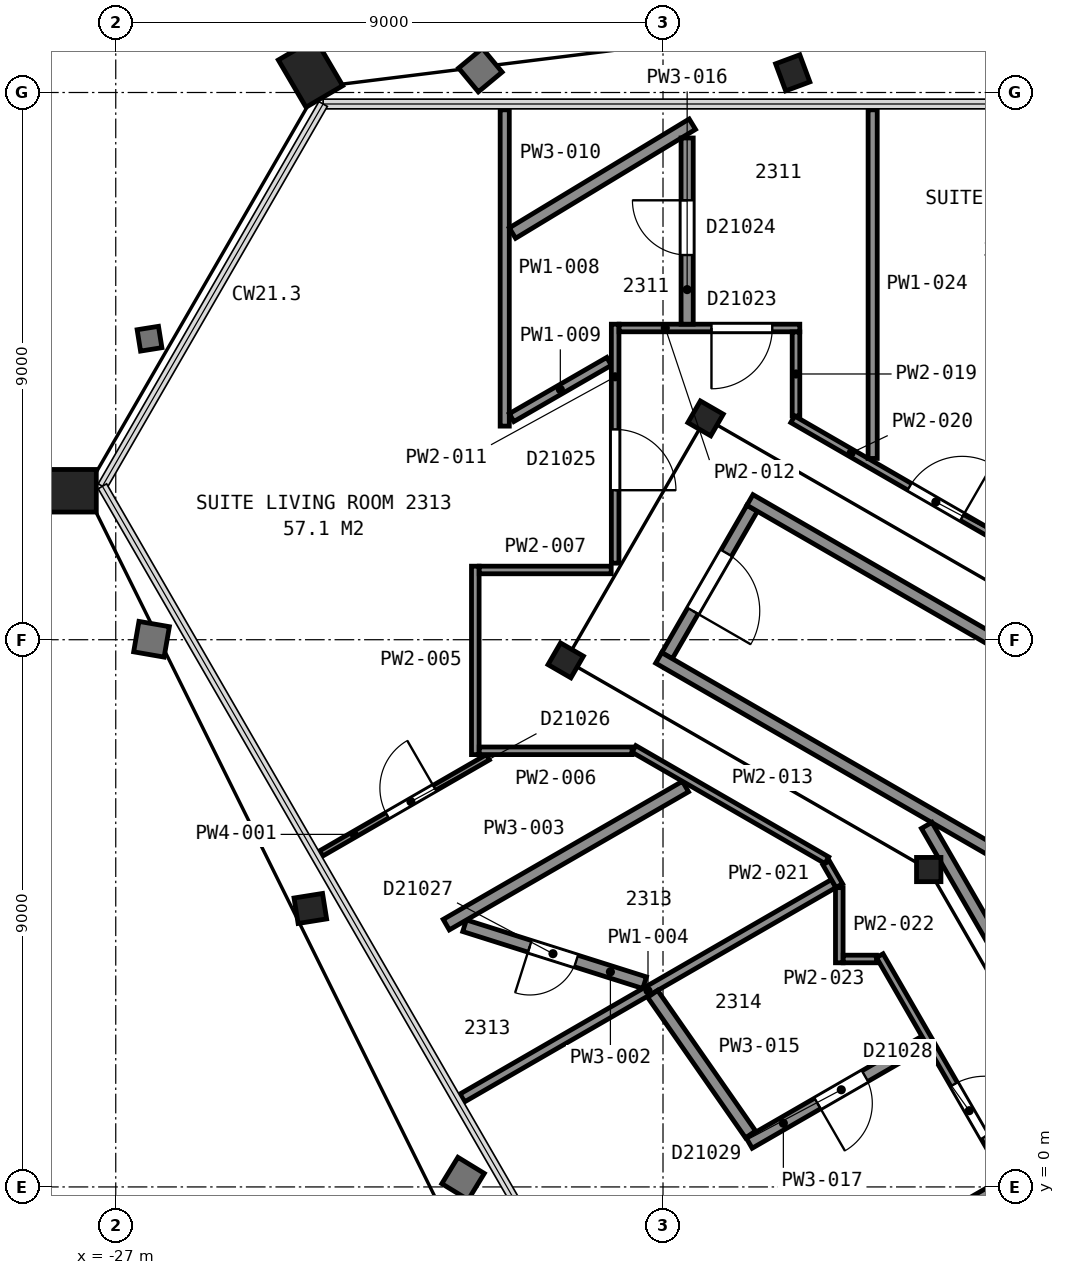
"""IFC4 building model, lengths in metres.
Left out: names, types, materials, properties, quantities, classifications, styles, units other than length and angle.
Written with IfcOpenShell. Run it as: python <this file> out.ifc"""

import sys

from ifc_helpers import new_model, si_unit, direction, frame, frame_2d, origin, origin_2d, place, context, subcontext, project, spatial, rectangle, hollow_rectangle, i_section, extrude, element, fill, save


model = new_model("IFC4")
c1 = context("Model", 3, precision=1e-05, world=origin(), true_north=direction((0.0, 1.0)))
c2 = subcontext(c1, "Body", "Model", "MODEL_VIEW")
j1 = project(units=[si_unit("LENGTHUNIT", "METRE"), si_unit("PLANEANGLEUNIT", "RADIAN")], contexts=[c1])
p1 = place(None, origin())
s1 = spatial("IfcSite", under=j1, at=p1, CompositionType="ELEMENT")
p2 = place(p1, origin())
s2 = spatial("IfcBuilding", under=s1, at=p2, CompositionType="ELEMENT")
p3 = place(p2, frame((0.0, 0.0, 100.0)))
s3 = spatial("IfcBuildingStorey", under=s2, at=p3, CompositionType="ELEMENT", Elevation=100.0)
p4 = place(p3, frame((-15.783, 18.099, 0.045), z_axis=(-0.070693557191, 0.19042310781, 0.97915344098), x_axis=(0.997401572089, -0.000160176462, 0.072042198318)))
e1 = element("IfcColumn", 1, at=p4, inside=s3, PredefinedType="COLUMN", context=c2, shape_type="SweptSolid", body=[
    extrude(i_section(OverallWidth=0.424, OverallDepth=0.475, WebThickness=0.048, FlangeThickness=0.077, FilletRadius=0.015, at=origin_2d()), origin(), (0.0, 0.0, 1.0), 3.585),
])
p5 = place(p3, frame((-23.668, 18.104, 0.075), z_axis=(-0.111145878735, 0.189707375629, 0.975529448696), x_axis=(0.496818547965, 0.860754575623, -0.110783080574)))
e2 = element("IfcColumn", 2, at=p5, inside=s3, PredefinedType="COLUMN", context=c2, shape_type="SweptSolid", body=[
    extrude(hollow_rectangle(XDim=0.7, YDim=0.9, WallThickness=0.065, at=origin_2d()), origin(), (0.0, 0.0, 1.0), 3.536),
])
p6 = place(p3, frame((-27.517, 11.45, 0.075), z_axis=(-0.21954669437, 0.0, 0.975601993126), x_axis=(0.496862162048, 0.860596286786, 0.111812446063)))
e3 = element("IfcColumn", 3, at=p6, inside=s3, PredefinedType="COLUMN", context=c2, shape_type="SweptSolid", body=[
    extrude(hollow_rectangle(XDim=0.7, YDim=0.9, WallThickness=0.065, at=origin_2d()), origin(), (0.0, 0.0, 1.0), 3.536),
])
p7 = place(p3, frame((-23.559, 4.618, 0.045), z_axis=(-0.203832262206, -0.03259955045, 0.978462916106), x_axis=(-0.498534021373, 0.86361257453, -0.075080960618)))
e4 = element("IfcColumn", 4, at=p7, inside=s3, PredefinedType="COLUMN", context=c2, shape_type="SweptSolid", body=[
    extrude(i_section(OverallWidth=0.424, OverallDepth=0.475, WebThickness=0.048, FlangeThickness=0.077, FilletRadius=0.015, at=origin_2d()), origin(), (0.0, 0.0, 1.0), 3.587),
])
for number, where, z_axis, x_axis in (
    (5, (-17.3, 12.64, 0.0), (0.0, 0.0, 1.0), (0.5, 0.866, 0.0)),
    (6, (-19.6, 8.66, 0.0), (0.0, 0.0, 1.0), (0.5, 0.866, 0.0)),
):
    element("IfcColumn", number, at=place(p3, frame(where, z_axis=z_axis, x_axis=x_axis)), inside=s3, PredefinedType="COLUMN", context=c2, shape_type="SweptSolid", body=[
        extrude(i_section(OverallWidth=0.411, OverallDepth=0.434, WebThickness=0.036, FlangeThickness=0.057, FilletRadius=0.015, at=origin_2d()), origin(), (0.0, 0.0, 1.0), 3.6),
    ])
p8 = place(p3, frame((-13.63, 5.22, 0.0), z_axis=(0.0, 0.0, 1.0), x_axis=(1.0, 0.0, 0.0)))
e7 = element("IfcColumn", 7, at=p8, inside=s3, PredefinedType="COLUMN", context=c2, shape_type="SweptSolid", body=[
    extrude(i_section(OverallWidth=0.401, OverallDepth=0.399, WebThickness=0.025, FlangeThickness=0.04, FilletRadius=0.015, at=origin_2d()), origin(), (0.0, 0.0, 1.0), 3.6),
])
p9 = place(p3, frame((-16.534, 11.162, 0.0), z_axis=(0.0, 0.0, 1.0), x_axis=(-0.49998411664, -0.866034573852, 0.0)))
e8 = element("IfcWall", 8, at=p9, inside=s3, PredefinedType="PARTITIONING", context=c2, shape_type="SweptSolid", body=[
    extrude(rectangle(XDim=2.8, YDim=0.2, at=frame_2d((1.4, 0.0))), origin(), (0.0, 0.0, 1.0), 3.35),
])
p10 = place(p9, frame((0.85, 0.0, 0.0)))
e9 = element("IfcOpeningElement", 9, at=p10, cuts=e8, PredefinedType="OPENING", context=c2, shape_type="SweptSolid", body=[
    extrude(rectangle(XDim=1.1, YDim=2.1, at=frame_2d((0.55, 1.05))), frame((0.0, 0.11, 0.0), z_axis=(0.0, -1.0, 0.0), x_axis=(1.0, 0.0, 0.0)), (0.0, 0.0, 1.0), 0.22),
])
for number, where, z_axis, x_axis in (
    (10, (-7.678, 2.701, 0.0), (0.0, 0.0, 1.0), (-0.866, 0.5, 0.0)),
    (11, (-6.178, 5.299, 0.0), (0.0, 0.0, 1.0), (-0.866, 0.5, 0.0)),
):
    element("IfcWall", number, at=place(p3, frame(where, z_axis=z_axis, x_axis=x_axis)), inside=s3, PredefinedType="PARTITIONING", context=c2, shape_type="SweptSolid", body=[
        extrude(rectangle(XDim=12.0, YDim=0.2, at=frame_2d((6.0, 0.0))), origin(), (0.0, 0.0, 1.0), 3.35),
    ])
p11 = place(p3, frame((-13.664, 5.946, 0.0), z_axis=(0.0, 0.0, 1.0), x_axis=(0.499994327219, -0.866028678941, 0.0)))
e12 = element("IfcWall", 12, at=p11, inside=s3, PredefinedType="PARTITIONING", context=c2, shape_type="SweptSolid", body=[
    extrude(rectangle(XDim=23.968, YDim=0.2, at=frame_2d((11.984, 0.0))), origin(), (0.0, 0.0, 1.0), 3.35),
])
p12 = place(p3, frame((-20.88, 7.067, 0.0), z_axis=(0.0, 0.0, 1.0), x_axis=(-0.866127794624, -0.499822611913, 0.0)))
e13 = element("IfcWall", 13, at=p12, inside=s3, PredefinedType="PARTITIONING", context=c2, shape_type="SweptSolid", body=[
    extrude(rectangle(XDim=3.165, YDim=0.1, at=frame_2d((1.583, 0.0))), origin(), (0.0, 0.0, 1.0), 2.613),
])
p13 = place(p12, frame((1.011, 0.0, 0.0)))
e14 = element("IfcOpeningElement", 14, at=p13, cuts=e13, PredefinedType="OPENING", context=c2, shape_type="SweptSolid", body=[
    extrude(rectangle(XDim=0.9, YDim=2.1, at=frame_2d((0.45, 1.05))), frame((0.0, 0.06, 0.0), z_axis=(0.0, -1.0, 0.0), x_axis=(1.0, 0.0, 0.0)), (0.0, 0.0, 1.0), 0.12),
])
p14 = place(p3, frame((-21.263, 4.296, 0.0), z_axis=(0.0, 0.0, 1.0), x_axis=(0.95341383314, -0.301665481582, 0.0)))
e15 = element("IfcWall", 15, at=p14, inside=s3, PredefinedType="PARTITIONING", context=c2, shape_type="SweptSolid", body=[
    extrude(rectangle(XDim=3.106, YDim=0.2, at=frame_2d((1.553, 0.0))), origin(), (0.0, 0.0, 1.0), 2.613),
])
p15 = place(p14, frame((1.125, 0.0, 0.0)))
e16 = element("IfcOpeningElement", 16, at=p15, cuts=e15, PredefinedType="OPENING", context=c2, shape_type="SweptSolid", body=[
    extrude(rectangle(XDim=0.8, YDim=2.1, at=frame_2d((0.4, 1.05))), frame((0.0, 0.11, 0.0), z_axis=(0.0, -1.0, 0.0), x_axis=(1.0, 0.0, 0.0)), (0.0, 0.0, 1.0), 0.22),
])
p16 = place(p3, frame((-21.565, 4.314, 0.0), z_axis=(0.0, 0.0, 1.0), x_axis=(0.866058501026, 0.499942669514, 0.0)))
e17 = element("IfcWall", 17, at=p16, inside=s3, PredefinedType="PARTITIONING", context=c2, shape_type="SweptSolid", body=[
    extrude(rectangle(XDim=4.542, YDim=0.2, at=frame_2d((2.271, 0.0))), origin(), (0.0, 0.0, 1.0), 2.613),
])
p17 = place(p3, frame((-21.301, 1.464, 0.0), z_axis=(0.0, 0.0, 1.0), x_axis=(0.866055299146, 0.49994821614, 0.0)))
e18 = element("IfcWall", 18, at=p17, inside=s3, PredefinedType="PARTITIONING", context=c2, shape_type="SweptSolid", body=[
    extrude(rectangle(XDim=7.052, YDim=0.15, at=frame_2d((3.526, 0.0))), origin(), (0.0, 0.0, 1.0), 2.613),
])
p18 = place(p3, frame((-21.087, 7.111, 0.0), z_axis=(0.0, 0.0, 1.0), x_axis=(0.0, 1.0, 0.0)))
e19 = element("IfcWall", 19, at=p18, inside=s3, PredefinedType="PARTITIONING", context=c2, shape_type="SweptSolid", body=[
    extrude(rectangle(XDim=3.099, YDim=0.125, at=frame_2d((1.549, 0.0))), origin(), (0.0, 0.0, 1.0), 2.613),
])
p19 = place(p3, frame((-21.022, 7.173, 0.0), z_axis=(0.0, 0.0, 1.0), x_axis=(1.0, 0.0, 0.0)))
e20 = element("IfcWall", 20, at=p19, inside=s3, PredefinedType="PARTITIONING", context=c2, shape_type="SweptSolid", body=[
    extrude(rectangle(XDim=2.513, YDim=0.125, at=frame_2d((1.256, 0.0))), origin(), (0.0, 0.0, 1.0), 2.613),
])
p20 = place(p3, frame((-21.022, 10.147, 0.0), z_axis=(0.0, 0.0, 1.0), x_axis=(1.0, 0.0, 0.0)))
e21 = element("IfcWall", 21, at=p20, inside=s3, PredefinedType="PARTITIONING", context=c2, shape_type="SweptSolid", body=[
    extrude(rectangle(XDim=2.17, YDim=0.125, at=frame_2d((1.085, 0.0))), origin(), (0.0, 0.0, 1.0), 2.613),
])
p21 = place(p3, frame((-20.603, 12.513, 0.0), z_axis=(0.0, 0.0, 1.0), x_axis=(0.0, 1.0, 0.0)))
e22 = element("IfcWall", 22, at=p21, inside=s3, PredefinedType="PARTITIONING", context=c2, shape_type="SweptSolid", body=[
    extrude(rectangle(XDim=5.202, YDim=0.15, at=frame_2d((2.601, 0.0))), origin(), (0.0, 0.0, 1.0), 2.613),
])
p22 = place(p3, frame((-20.49, 12.653, 0.0), z_axis=(0.0, 0.0, 1.0), x_axis=(0.866141673836, 0.499798560267, 0.0)))
e23 = element("IfcWall", 23, at=p22, inside=s3, PredefinedType="PARTITIONING", context=c2, shape_type="SweptSolid", body=[
    extrude(rectangle(XDim=1.851, YDim=0.15, at=frame_2d((0.926, 0.0))), origin(), (0.0, 0.0, 1.0), 2.613),
])
p23 = place(p3, frame((-20.476, 15.688, 0.0), z_axis=(0.0, 0.0, 1.0), x_axis=(0.855493496237, 0.517813555148, 0.0)))
e24 = element("IfcWall", 24, at=p23, inside=s3, PredefinedType="PARTITIONING", context=c2, shape_type="SweptSolid", body=[
    extrude(rectangle(XDim=3.459, YDim=0.2, at=frame_2d((1.729, 0.0))), origin(), (0.0, 0.0, 1.0), 2.613),
])
p24 = place(p3, frame((-18.787, 10.259, 0.0), z_axis=(0.0, 0.0, 1.0), x_axis=(0.0, 1.0, 0.0)))
e25 = element("IfcWall", 25, at=p24, inside=s3, PredefinedType="PARTITIONING", context=c2, shape_type="SweptSolid", body=[
    extrude(rectangle(XDim=3.93, YDim=0.125, at=frame_2d((1.965, 0.0))), origin(), (0.0, 0.0, 1.0), 2.613),
])
p25 = place(p24, frame((1.2, 0.0, 0.0)))
e26 = element("IfcOpeningElement", 26, at=p25, cuts=e25, PredefinedType="OPENING", context=c2, shape_type="SweptSolid", body=[
    extrude(rectangle(XDim=1.0, YDim=2.1, at=frame_2d((0.5, 1.05))), frame((0.0, 0.073, 0.0), z_axis=(0.0, -1.0, 0.0), x_axis=(1.0, 0.0, 0.0)), (0.0, 0.0, 1.0), 0.145),
])
p26 = place(p3, frame((-18.722, 14.127, 0.0), z_axis=(0.0, 0.0, 1.0), x_axis=(1.0, 0.0, 0.0)))
e27 = element("IfcWall", 27, at=p26, inside=s3, PredefinedType="PARTITIONING", context=c2, shape_type="SweptSolid", body=[
    extrude(rectangle(XDim=2.971, YDim=0.125, at=frame_2d((1.486, 0.0))), origin(), (0.0, 0.0, 1.0), 2.613),
])
p27 = place(p26, frame((1.519, 0.0, 0.0)))
e28 = element("IfcOpeningElement", 28, at=p27, cuts=e27, PredefinedType="OPENING", context=c2, shape_type="SweptSolid", body=[
    extrude(rectangle(XDim=1.0, YDim=2.1, at=frame_2d((0.5, 1.05))), frame((0.0, 0.073, 0.0), z_axis=(0.0, -1.0, 0.0), x_axis=(1.0, 0.0, 0.0)), (0.0, 0.0, 1.0), 0.145),
])
p28 = place(p3, frame((-18.478, 7.204, 0.0), z_axis=(0.0, 0.0, 1.0), x_axis=(0.866011320536, -0.500024392108, 0.0)))
e29 = element("IfcWall", 29, at=p28, inside=s3, PredefinedType="PARTITIONING", context=c2, shape_type="SweptSolid", body=[
    extrude(rectangle(XDim=3.663, YDim=0.125, at=frame_2d((1.832, 0.0))), origin(), (0.0, 0.0, 1.0), 2.613),
])
p29 = place(p3, frame((-18.466, -3.445, 0.0), z_axis=(0.0, 0.0, 1.0), x_axis=(0.86605175433, 0.499954356739, 0.0)))
e30 = element("IfcWall", 30, at=p29, inside=s3, PredefinedType="PARTITIONING", context=c2, shape_type="SweptSolid", body=[
    extrude(rectangle(XDim=7.048, YDim=0.15, at=frame_2d((3.524, 0.0))), origin(), (0.0, 0.0, 1.0), 2.613),
])
p30 = place(p3, frame((-18.17, 3.175, 0.0), z_axis=(0.0, 0.0, 1.0), x_axis=(0.571541682724, -0.820573034476, 0.0)))
e31 = element("IfcWall", 31, at=p30, inside=s3, PredefinedType="PARTITIONING", context=c2, shape_type="SweptSolid", body=[
    extrude(rectangle(XDim=2.818, YDim=0.2, at=frame_2d((1.409, 0.0))), origin(), (0.0, 0.0, 1.0), 2.613),
])
p31 = place(p3, frame((-17.603, 14.189, 0.0), z_axis=(0.0, 0.0, 1.0), x_axis=(0.0, 1.0, 0.0)))
e32 = element("IfcWall", 32, at=p31, inside=s3, PredefinedType="PARTITIONING", context=c2, shape_type="SweptSolid", body=[
    extrude(rectangle(XDim=3.062, YDim=0.2, at=frame_2d((1.531, 0.0))), origin(), (0.0, 0.0, 1.0), 2.613),
])
p32 = place(p31, frame((1.137, 0.0, 0.0)))
e33 = element("IfcOpeningElement", 33, at=p32, cuts=e32, PredefinedType="OPENING", context=c2, shape_type="SweptSolid", body=[
    extrude(rectangle(XDim=0.9, YDim=2.1, at=frame_2d((0.45, 1.05))), frame((0.0, 0.11, 0.0), z_axis=(0.0, -1.0, 0.0), x_axis=(1.0, 0.0, 0.0)), (0.0, 0.0, 1.0), 0.22),
])
p33 = place(p3, frame((-16.583, 0.723, 0.0), z_axis=(0.0, 0.0, 1.0), x_axis=(0.866001642064, 0.500041154249, 0.0)))
e34 = element("IfcWall", 34, at=p33, inside=s3, PredefinedType="PARTITIONING", context=c2, shape_type="SweptSolid", body=[
    extrude(rectangle(XDim=3.338, YDim=0.2, at=frame_2d((1.669, 0.0))), origin(), (0.0, 0.0, 1.0), 2.613),
])
p34 = place(p33, frame((1.3, 0.0, 0.0)))
e35 = element("IfcOpeningElement", 35, at=p34, cuts=e34, PredefinedType="OPENING", context=c2, shape_type="SweptSolid", body=[
    extrude(rectangle(XDim=0.9, YDim=2.1, at=frame_2d((0.45, 1.05))), frame((0.0, 0.11, 0.0), z_axis=(0.0, -1.0, 0.0), x_axis=(1.0, 0.0, 0.0)), (0.0, 0.0, 1.0), 0.22),
])
p35 = place(p3, frame((-15.813, 12.679, 0.0), z_axis=(0.0, 0.0, 1.0), x_axis=(0.0, 1.0, 0.0)))
e36 = element("IfcWall", 36, at=p35, inside=s3, PredefinedType="PARTITIONING", context=c2, shape_type="SweptSolid", body=[
    extrude(rectangle(XDim=1.383, YDim=0.125, at=frame_2d((0.691, 0.0))), origin(), (0.0, 0.0, 1.0), 2.613),
])
p36 = place(p3, frame((-15.867, 12.625, 0.0), z_axis=(0.0, 0.0, 1.0), x_axis=(0.86603035395, -0.499991425964, 0.0)))
e37 = element("IfcWall", 37, at=p36, inside=s3, PredefinedType="PARTITIONING", context=c2, shape_type="SweptSolid", body=[
    extrude(rectangle(XDim=3.824, YDim=0.125, at=frame_2d((1.912, 0.0))), origin(), (0.0, 0.0, 1.0), 2.613),
])
p37 = place(p36, frame((2.219, 0.0, 0.0)))
e38 = element("IfcOpeningElement", 38, at=p37, cuts=e37, PredefinedType="OPENING", context=c2, shape_type="SweptSolid", body=[
    extrude(rectangle(XDim=1.0, YDim=2.1, at=frame_2d((0.5, 1.05))), frame((0.0, 0.073, 0.0), z_axis=(0.0, -1.0, 0.0), x_axis=(1.0, 0.0, 0.0)), (0.0, 0.0, 1.0), 0.145),
])
p38 = place(p3, frame((-15.318, 5.33, 0.0), z_axis=(0.0, 0.0, 1.0), x_axis=(0.499836277606, -0.86611990832, 0.0)))
e39 = element("IfcWall", 39, at=p38, inside=s3, PredefinedType="PARTITIONING", context=c2, shape_type="SweptSolid", body=[
    extrude(rectangle(XDim=0.433, YDim=0.125, at=frame_2d((0.217, 0.0))), origin(), (0.0, 0.0, 1.0), 2.613),
])
p39 = place(p3, frame((-15.101, 3.687, 0.0), z_axis=(0.0, 0.0, 1.0), x_axis=(0.0, 1.0, 0.0)))
e40 = element("IfcWall", 40, at=p39, inside=s3, PredefinedType="PARTITIONING", context=c2, shape_type="SweptSolid", body=[
    extrude(rectangle(XDim=1.236, YDim=0.125, at=frame_2d((0.618, 0.0))), origin(), (0.0, 0.0, 1.0), 2.613),
])
p40 = place(p3, frame((-15.036, 3.749, 0.0), z_axis=(0.0, 0.0, 1.0), x_axis=(1.0, 0.0, 0.0)))
e41 = element("IfcWall", 41, at=p40, inside=s3, PredefinedType="PARTITIONING", context=c2, shape_type="SweptSolid", body=[
    extrude(rectangle(XDim=0.547, YDim=0.125, at=frame_2d((0.273, 0.0))), origin(), (0.0, 0.0, 1.0), 2.613),
])
p41 = place(p3, frame((-14.552, 11.981, 0.0), z_axis=(0.0, 0.0, 1.0), x_axis=(0.0, 1.0, 0.0)))
e42 = element("IfcWall", 42, at=p41, inside=s3, PredefinedType="PARTITIONING", context=c2, shape_type="SweptSolid", body=[
    extrude(rectangle(XDim=5.734, YDim=0.15, at=frame_2d((2.867, 0.0))), origin(), (0.0, 0.0, 1.0), 2.613),
])
p42 = place(p3, frame((-9.41, -4.902, 0.0), z_axis=(0.0, 0.0, 1.0), x_axis=(-0.499971244726, 0.866042005013, 0.0)))
e43 = element("IfcWall", 43, at=p42, inside=s3, PredefinedType="PARTITIONING", context=c2, shape_type="SweptSolid", body=[
    extrude(rectangle(XDim=10.052, YDim=0.125, at=frame_2d((5.026, 0.0))), origin(), (0.0, 0.0, 1.0), 2.613),
])
p43 = place(p42, frame((6.608, 0.0, 0.0)))
e44 = element("IfcOpeningElement", 44, at=p43, cuts=e43, PredefinedType="OPENING", context=c2, shape_type="SweptSolid", body=[
    extrude(rectangle(XDim=1.0, YDim=2.1, at=frame_2d((0.5, 1.05))), frame((0.0, 0.073, 0.0), z_axis=(0.0, -1.0, 0.0), x_axis=(1.0, 0.0, 0.0)), (0.0, 0.0, 1.0), 0.145),
])
p44 = place(p42, frame((2.989, 0.0, 0.0)))
e45 = element("IfcOpeningElement", 45, at=p44, cuts=e43, PredefinedType="OPENING", context=c2, shape_type="SweptSolid", body=[
    extrude(rectangle(XDim=1.0, YDim=2.1, at=frame_2d((0.5, 1.05))), frame((0.0, 0.073, 0.0), z_axis=(0.0, -1.0, 0.0), x_axis=(1.0, 0.0, 0.0)), (0.0, 0.0, 1.0), 0.145),
])
p45 = place(p10, origin())
e46 = element("IfcDoor", 46, at=p45, inside=s3, OperationType="SINGLE_SWING_RIGHT", PredefinedType="DOOR", context=c2, shape_type="SweptSolid", body=[
    extrude(rectangle(XDim=1.1, YDim=2.1, at=frame_2d((0.55, 1.05))), frame((0.0, 0.025, 0.0), z_axis=(0.0, -1.0, 0.0), x_axis=(1.0, 0.0, 0.0)), (0.0, 0.0, 1.0), 0.05),
])
fill(e9, e46)
p46 = place(p13, origin())
e47 = element("IfcDoor", 47, at=p46, inside=s3, OperationType="SINGLE_SWING_LEFT", PredefinedType="DOOR", context=c2, shape_type="SweptSolid", body=[
    extrude(rectangle(XDim=0.9, YDim=2.1, at=frame_2d((0.45, 1.05))), frame((0.0, 0.025, 0.0), z_axis=(0.0, -1.0, 0.0), x_axis=(1.0, 0.0, 0.0)), (0.0, 0.0, 1.0), 0.05),
])
fill(e14, e47)
p47 = place(p15, origin())
e48 = element("IfcDoor", 48, at=p47, inside=s3, OperationType="SINGLE_SWING_LEFT", PredefinedType="DOOR", context=c2, shape_type="SweptSolid", body=[
    extrude(rectangle(XDim=0.8, YDim=2.1, at=frame_2d((0.4, 1.05))), frame((0.0, 0.025, 0.0), z_axis=(0.0, -1.0, 0.0), x_axis=(1.0, 0.0, 0.0)), (0.0, 0.0, 1.0), 0.05),
])
fill(e16, e48)
p48 = place(p25, origin())
e49 = element("IfcDoor", 49, at=p48, inside=s3, OperationType="SINGLE_SWING_LEFT", PredefinedType="DOOR", context=c2, shape_type="SweptSolid", body=[
    extrude(rectangle(XDim=1.0, YDim=2.1, at=frame_2d((0.5, 1.05))), frame((0.0, 0.025, 0.0), z_axis=(0.0, -1.0, 0.0), x_axis=(1.0, 0.0, 0.0)), (0.0, 0.0, 1.0), 0.05),
])
fill(e26, e49)
p49 = place(p27, origin())
e50 = element("IfcDoor", 50, at=p49, inside=s3, OperationType="SINGLE_SWING_LEFT", PredefinedType="DOOR", context=c2, shape_type="SweptSolid", body=[
    extrude(rectangle(XDim=1.0, YDim=2.1, at=frame_2d((0.5, 1.05))), frame((0.0, 0.025, 0.0), z_axis=(0.0, -1.0, 0.0), x_axis=(1.0, 0.0, 0.0)), (0.0, 0.0, 1.0), 0.05),
])
fill(e28, e50)
p50 = place(p32, origin())
e51 = element("IfcDoor", 51, at=p50, inside=s3, OperationType="SINGLE_SWING_RIGHT", PredefinedType="DOOR", context=c2, shape_type="SweptSolid", body=[
    extrude(rectangle(XDim=0.9, YDim=2.1, at=frame_2d((0.45, 1.05))), frame((0.0, 0.025, 0.0), z_axis=(0.0, -1.0, 0.0), x_axis=(1.0, 0.0, 0.0)), (0.0, 0.0, 1.0), 0.05),
])
fill(e33, e51)
p51 = place(p34, origin())
e52 = element("IfcDoor", 52, at=p51, inside=s3, OperationType="SINGLE_SWING_LEFT", PredefinedType="DOOR", context=c2, shape_type="SweptSolid", body=[
    extrude(rectangle(XDim=0.9, YDim=2.1, at=frame_2d((0.45, 1.05))), frame((0.0, 0.025, 0.0), z_axis=(0.0, -1.0, 0.0), x_axis=(1.0, 0.0, 0.0)), (0.0, 0.0, 1.0), 0.05),
])
fill(e35, e52)
p52 = place(p37, origin())
e53 = element("IfcDoor", 53, at=p52, inside=s3, OperationType="SINGLE_SWING_RIGHT", PredefinedType="DOOR", context=c2, shape_type="SweptSolid", body=[
    extrude(rectangle(XDim=1.0, YDim=2.1, at=frame_2d((0.5, 1.05))), frame((0.0, 0.025, 0.0), z_axis=(0.0, -1.0, 0.0), x_axis=(1.0, 0.0, 0.0)), (0.0, 0.0, 1.0), 0.05),
])
fill(e38, e53)
p53 = place(p43, origin())
e54 = element("IfcDoor", 54, at=p53, inside=s3, OperationType="SINGLE_SWING_LEFT", PredefinedType="DOOR", context=c2, shape_type="SweptSolid", body=[
    extrude(rectangle(XDim=1.0, YDim=2.1, at=frame_2d((0.5, 1.05))), frame((0.0, 0.025, 0.0), z_axis=(0.0, -1.0, 0.0), x_axis=(1.0, 0.0, 0.0)), (0.0, 0.0, 1.0), 0.05),
])
fill(e44, e54)
save(model, sys.argv[1])
